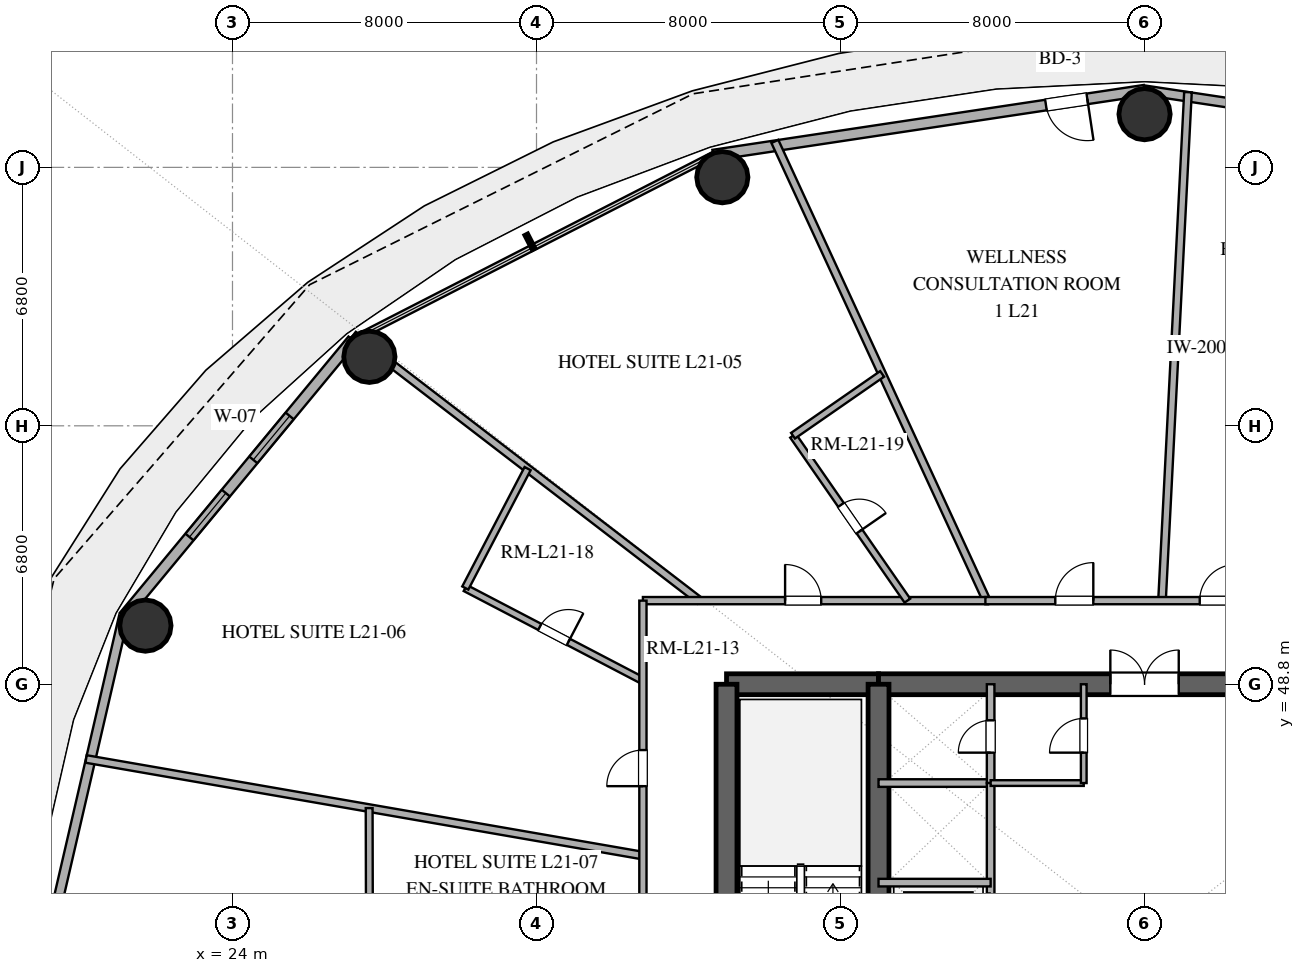
"""IFC4 building model, lengths in metres.
Left out: names, types, materials, properties, quantities, classifications, styles, units other than length and angle.
Written with IfcOpenShell. Run it as: python <this file> out.ifc"""

import sys

from ifc_helpers import new_model, si_unit, direction, frame, frame_2d, origin, origin_2d, place, context, subcontext, project, spatial, rectangle, hollow_circle, extrude, element, fill, save


model = new_model("IFC4")
c1 = context("Model", 3, precision=1e-05, world=origin(), true_north=direction((0.0, 1.0)))
c2 = subcontext(c1, "Body", "Model", "MODEL_VIEW")
j1 = project(units=[si_unit("LENGTHUNIT", "METRE"), si_unit("PLANEANGLEUNIT", "RADIAN")], contexts=[c1])
p1 = place(None, origin())
s1 = spatial("IfcSite", under=j1, at=p1, CompositionType="ELEMENT")
p2 = place(p1, origin())
s2 = spatial("IfcBuilding", under=s1, at=p2, CompositionType="ELEMENT")
p3 = place(p2, frame((0.0, 0.0, 87.6)))
s3 = spatial("IfcBuildingStorey", under=s2, at=p3, CompositionType="ELEMENT", Elevation=87.6)
p4 = place(p3, frame((37.0, 48.8, 0.0), z_axis=(0.0, 0.0, 1.0), x_axis=(1.0, 0.0, 0.0)))
e1 = element("IfcWall", 1, at=p4, inside=s3, PredefinedType="SHEAR", context=c2, shape_type="SweptSolid", body=[
    extrude(rectangle(XDim=4.0, YDim=0.55, at=frame_2d((2.0, 0.0))), origin(), (0.0, 0.0, 1.0), 3.38),
])
p5 = place(p3, frame((41.0, 48.8, 0.0), z_axis=(0.0, 0.0, 1.0), x_axis=(1.0, 0.0, 0.0)))
e2 = element("IfcWall", 2, at=p5, inside=s3, PredefinedType="SHEAR", context=c2, shape_type="SweptSolid", body=[
    extrude(rectangle(XDim=14.0, YDim=0.55, at=frame_2d((7.0, 0.0))), origin(), (0.0, 0.0, 1.0), 3.38),
])
p6 = place(p5, frame((6.1, 0.0, 0.0)))
e3 = element("IfcOpeningElement", 3, at=p6, cuts=e2, PredefinedType="OPENING", context=c2, shape_type="SweptSolid", body=[
    extrude(rectangle(XDim=1.8, YDim=2.25, at=frame_2d((0.9, 1.125))), frame((0.0, 0.285, 0.0), z_axis=(0.0, -1.0, 0.0), x_axis=(1.0, 0.0, 0.0)), (0.0, 0.0, 1.0), 0.57),
])
p7 = place(p3, frame((37.0, 35.2, 0.0), z_axis=(0.0, 0.0, 1.0), x_axis=(0.0, 1.0, 0.0)))
e4 = element("IfcWall", 4, at=p7, inside=s3, PredefinedType="SHEAR", context=c2, shape_type="SweptSolid", body=[
    extrude(rectangle(XDim=13.6, YDim=0.55, at=frame_2d((6.8, 0.0))), origin(), (0.0, 0.0, 1.0), 3.38),
])
p8 = place(p7, frame((1.5, 0.0, 0.0)))
e5 = element("IfcOpeningElement", 5, at=p8, cuts=e4, PredefinedType="OPENING", context=c2, shape_type="SweptSolid", body=[
    extrude(rectangle(XDim=1.2, YDim=2.15, at=frame_2d((0.6, 1.075))), frame((0.0, 0.285, 0.0), z_axis=(0.0, -1.0, 0.0), x_axis=(1.0, 0.0, 0.0)), (0.0, 0.0, 1.0), 0.57),
])
p9 = place(p3, frame((41.0, 35.2, 0.0), z_axis=(0.0, 0.0, 1.0), x_axis=(0.0, 1.0, 0.0)))
e6 = element("IfcWall", 6, at=p9, inside=s3, PredefinedType="SHEAR", context=c2, shape_type="SweptSolid", body=[
    extrude(rectangle(XDim=13.6, YDim=0.55, at=frame_2d((6.8, 0.0))), origin(), (0.0, 0.0, 1.0), 3.38),
])
p10 = place(p9, frame((1.15, 0.0, 0.0)))
e7 = element("IfcOpeningElement", 7, at=p10, cuts=e6, PredefinedType="OPENING", context=c2, shape_type="SweptSolid", body=[
    extrude(rectangle(XDim=1.1, YDim=2.2, at=frame_2d((0.55, 1.1))), frame((0.0, 0.285, 0.0), z_axis=(0.0, -1.0, 0.0), x_axis=(1.0, 0.0, 0.0)), (0.0, 0.0, 1.0), 0.57),
])
for number, where, z_axis, x_axis in (
    (8, (48.0, 63.8, 0.0), (0.0, 0.0, 1.0), (1.0, 0.0, 0.0)),
    (9, (36.89, 62.141, 0.0), (0.0, 0.0, 1.0), (1.0, 0.0, 0.0)),
    (10, (27.602, 57.415, 0.0), (0.0, 0.0, 1.0), (1.0, 0.0, 0.0)),
    (11, (21.709, 50.343, 0.0), (0.0, 0.0, 1.0), (1.0, 0.0, 0.0)),
):
    element("IfcColumn", number, at=place(p3, frame(where, z_axis=z_axis, x_axis=x_axis)), inside=s3, PredefinedType="COLUMN", context=c2, shape_type="SweptSolid", body=[
        extrude(hollow_circle(Radius=0.675, WallThickness=0.036, at=origin_2d()), origin(), (0.0, 0.0, 1.0), 3.38),
    ])
p11 = place(p3, frame((59.351, 62.723, 0.0), z_axis=(0.0, 0.0, 1.0), x_axis=(-0.988877774656, 0.148730450117, 0.0)))
e12 = element("IfcWall", 12, at=p11, inside=s3, PredefinedType="SOLIDWALL", context=c2, shape_type="SweptSolid", body=[
    extrude(rectangle(XDim=11.479, YDim=0.25, at=frame_2d((5.74, 0.0))), origin(), (0.0, 0.0, 1.0), 3.38),
])
p12 = place(p11, frame((7.508, 0.0, 1.42)))
e13 = element("IfcOpeningElement", 13, at=p12, cuts=e12, PredefinedType="OPENING", context=c2, shape_type="SweptSolid", body=[
    extrude(rectangle(XDim=1.0, YDim=1.05, at=frame_2d((0.5, 0.525))), frame((0.0, 0.135, 0.0), z_axis=(0.0, -1.0, 0.0), x_axis=(1.0, 0.0, 0.0)), (0.0, 0.0, 1.0), 0.27),
])
p13 = place(p3, frame((48.0, 64.43, 0.0), z_axis=(0.0, 0.0, 1.0), x_axis=(-0.988877774656, -0.148730450117, 0.0)))
e14 = element("IfcWall", 14, at=p13, inside=s3, PredefinedType="SOLIDWALL", context=c2, shape_type="SweptSolid", body=[
    extrude(rectangle(XDim=11.479, YDim=0.28, at=frame_2d((5.74, 0.0))), origin(), (0.0, 0.0, 1.0), 3.38),
])
p14 = place(p13, frame((1.524, 0.0, 0.0)))
e15 = element("IfcOpeningElement", 15, at=p14, cuts=e14, PredefinedType="OPENING", context=c2, shape_type="SweptSolid", body=[
    extrude(rectangle(XDim=1.1, YDim=2.25, at=frame_2d((0.55, 1.125))), frame((0.0, 0.15, 0.0), z_axis=(0.0, -1.0, 0.0), x_axis=(1.0, 0.0, 0.0)), (0.0, 0.0, 1.0), 0.3),
])
p15 = place(p3, frame((27.16, 57.86, 0.0), z_axis=(0.0, 0.0, 1.0), x_axis=(-0.637505817448, -0.770445541696, 0.0)))
e16 = element("IfcWall", 16, at=p15, inside=s3, PredefinedType="SOLIDWALL", context=c2, shape_type="SweptSolid", body=[
    extrude(rectangle(XDim=9.445, YDim=0.28, at=frame_2d((4.723, 0.0))), origin(), (0.0, 0.0, 1.0), 3.38),
])
p16 = place(p15, frame((2.597, 0.0, 0.85)))
e17 = element("IfcOpeningElement", 17, at=p16, cuts=e16, PredefinedType="OPENING", context=c2, shape_type="SweptSolid", body=[
    extrude(rectangle(XDim=1.5, YDim=1.8, at=frame_2d((0.75, 0.9))), frame((0.0, 0.15, 0.0), z_axis=(0.0, -1.0, 0.0), x_axis=(1.0, 0.0, 0.0)), (0.0, 0.0, 1.0), 0.3),
])
p17 = place(p15, frame((5.232, 0.0, 0.85)))
e18 = element("IfcOpeningElement", 18, at=p17, cuts=e16, PredefinedType="OPENING", context=c2, shape_type="SweptSolid", body=[
    extrude(rectangle(XDim=1.5, YDim=1.8, at=frame_2d((0.75, 0.9))), frame((0.0, 0.15, 0.0), z_axis=(0.0, -1.0, 0.0), x_axis=(1.0, 0.0, 0.0)), (0.0, 0.0, 1.0), 0.3),
])
p18 = place(p3, frame((21.139, 50.583, 0.0), z_axis=(0.0, 0.0, 1.0), x_axis=(-0.22558597182, -0.974223264616, 0.0)))
e19 = element("IfcWall", 19, at=p18, inside=s3, PredefinedType="SOLIDWALL", context=c2, shape_type="SweptSolid", body=[
    extrude(rectangle(XDim=8.811, YDim=0.25, at=frame_2d((4.405, 0.0))), origin(), (0.0, 0.0, 1.0), 3.38),
])
p19 = place(p3, frame((41.0, 46.2, 0.0), z_axis=(0.0, 0.0, 1.0), x_axis=(1.0, 0.0, 0.0)))
e20 = element("IfcWall", 20, at=p19, inside=s3, PredefinedType="SOLIDWALL", context=c2, shape_type="SweptSolid", body=[
    extrude(rectangle(XDim=2.95, YDim=0.2, at=frame_2d((1.475, 0.0))), origin(), (0.0, 0.0, 1.0), 2.74),
])
p20 = place(p3, frame((43.95, 46.2, 0.0), z_axis=(0.0, 0.0, 1.0), x_axis=(0.0, 1.0, 0.0)))
e21 = element("IfcWall", 21, at=p20, inside=s3, PredefinedType="SOLIDWALL", context=c2, shape_type="SweptSolid", body=[
    extrude(rectangle(XDim=2.6, YDim=0.2, at=frame_2d((1.3, 0.0))), origin(), (0.0, 0.0, 1.0), 2.74),
])
p21 = place(p20, frame((0.8, 0.0, 0.0)))
e22 = element("IfcOpeningElement", 22, at=p21, cuts=e21, PredefinedType="OPENING", context=c2, shape_type="SweptSolid", body=[
    extrude(rectangle(XDim=0.85, YDim=2.15, at=frame_2d((0.425, 1.075))), frame((0.0, 0.11, 0.0), z_axis=(0.0, -1.0, 0.0), x_axis=(1.0, 0.0, 0.0)), (0.0, 0.0, 1.0), 0.22),
])
p22 = place(p3, frame((43.95, 38.4, 0.0), z_axis=(0.0, 0.0, 1.0), x_axis=(0.0, 1.0, 0.0)))
e23 = element("IfcWall", 23, at=p22, inside=s3, PredefinedType="SOLIDWALL", context=c2, shape_type="SweptSolid", body=[
    extrude(rectangle(XDim=7.8, YDim=0.2, at=frame_2d((3.9, 0.0))), origin(), (0.0, 0.0, 1.0), 2.74),
])
p23 = place(p22, frame((0.7, 0.0, 0.0)))
e24 = element("IfcOpeningElement", 24, at=p23, cuts=e23, PredefinedType="OPENING", context=c2, shape_type="SweptSolid", body=[
    extrude(rectangle(XDim=1.1, YDim=2.2, at=frame_2d((0.55, 1.1))), frame((0.0, 0.11, 0.0), z_axis=(0.0, -1.0, 0.0), x_axis=(1.0, 0.0, 0.0)), (0.0, 0.0, 1.0), 0.22),
])
p24 = place(p22, frame((3.3, 0.0, 0.0)))
e25 = element("IfcOpeningElement", 25, at=p24, cuts=e23, PredefinedType="OPENING", context=c2, shape_type="SweptSolid", body=[
    extrude(rectangle(XDim=1.1, YDim=2.2, at=frame_2d((0.55, 1.1))), frame((0.0, 0.11, 0.0), z_axis=(0.0, -1.0, 0.0), x_axis=(1.0, 0.0, 0.0)), (0.0, 0.0, 1.0), 0.22),
])
p25 = place(p3, frame((41.0, 43.58, 0.0), z_axis=(0.0, 0.0, 1.0), x_axis=(1.0, 0.0, 0.0)))
e26 = element("IfcWall", 26, at=p25, inside=s3, PredefinedType="SOLIDWALL", context=c2, shape_type="SweptSolid", body=[
    extrude(rectangle(XDim=2.95, YDim=0.2, at=frame_2d((1.475, 0.0))), origin(), (0.0, 0.0, 1.0), 2.74),
])
p26 = place(p3, frame((43.95, 46.2, 0.0), z_axis=(0.0, 0.0, 1.0), x_axis=(1.0, 0.0, 0.0)))
e27 = element("IfcWall", 27, at=p26, inside=s3, PredefinedType="PARTITIONING", context=c2, shape_type="SweptSolid", body=[
    extrude(rectangle(XDim=2.45, YDim=0.15, at=frame_2d((1.225, 0.0))), origin(), (0.0, 0.0, 1.0), 2.74),
])
p27 = place(p3, frame((46.4, 46.2, 0.0), z_axis=(0.0, 0.0, 1.0), x_axis=(0.0, 1.0, 0.0)))
e28 = element("IfcWall", 28, at=p27, inside=s3, PredefinedType="PARTITIONING", context=c2, shape_type="SweptSolid", body=[
    extrude(rectangle(XDim=2.6, YDim=0.15, at=frame_2d((1.3, 0.0))), origin(), (0.0, 0.0, 1.0), 2.74),
])
p28 = place(p27, frame((0.8, 0.0, 0.0)))
e29 = element("IfcOpeningElement", 29, at=p28, cuts=e28, PredefinedType="OPENING", context=c2, shape_type="SweptSolid", body=[
    extrude(rectangle(XDim=0.9, YDim=2.15, at=frame_2d((0.45, 1.075))), frame((0.0, 0.085, 0.0), z_axis=(0.0, -1.0, 0.0), x_axis=(1.0, 0.0, 0.0)), (0.0, 0.0, 1.0), 0.17),
])
p29 = place(p3, frame((49.143, 64.379, 0.0), z_axis=(0.0, 0.0, 1.0), x_axis=(-0.050973793346, -0.998699991185, 0.0)))
e30 = element("IfcWall", 30, at=p29, inside=s3, PredefinedType="PARTITIONING", context=c2, shape_type="SweptSolid", body=[
    extrude(rectangle(XDim=13.396, YDim=0.2, at=frame_2d((6.698, 0.0))), origin(), (0.0, 0.0, 1.0), 2.74),
])
p30 = place(p3, frame((34.8, 44.291, 0.0), z_axis=(0.0, 0.0, 1.0), x_axis=(-0.985271938133, 0.170994759944, 0.0)))
e31 = element("IfcWall", 31, at=p30, inside=s3, PredefinedType="PARTITIONING", context=c2, shape_type="SweptSolid", body=[
    extrude(rectangle(XDim=14.872, YDim=0.2, at=frame_2d((7.436, 0.0))), origin(), (0.0, 0.0, 1.0), 2.74),
])
p31 = place(p3, frame((43.847, 51.0, 0.0), z_axis=(0.0, 0.0, 1.0), x_axis=(-0.418953467184, 0.908007704997, 0.0)))
e32 = element("IfcWall", 32, at=p31, inside=s3, PredefinedType="PARTITIONING", context=c2, shape_type="SweptSolid", body=[
    extrude(rectangle(XDim=13.307, YDim=0.2, at=frame_2d((6.654, 0.0))), origin(), (0.0, 0.0, 1.0), 2.74),
])
p32 = place(p3, frame((36.287, 51.0, 0.0), z_axis=(0.0, 0.0, 1.0), x_axis=(-0.792955910196, 0.609279020224, 0.0)))
e33 = element("IfcWall", 33, at=p32, inside=s3, PredefinedType="PARTITIONING", context=c2, shape_type="SweptSolid", body=[
    extrude(rectangle(XDim=11.48, YDim=0.2, at=frame_2d((5.74, 0.0))), origin(), (0.0, 0.0, 1.0), 2.74),
])
p33 = place(p3, frame((34.8, 51.0, 0.0), z_axis=(0.0, 0.0, 1.0), x_axis=(1.0, 0.0, 0.0)))
e34 = element("IfcWall", 34, at=p33, inside=s3, PredefinedType="PARTITIONING", context=c2, shape_type="SweptSolid", body=[
    extrude(rectangle(XDim=9.083, YDim=0.19, at=frame_2d((4.541, 0.0))), origin(), (0.0, 0.0, 1.0), 2.74),
])
p34 = place(p33, frame((3.741, 0.0, 0.0)))
e35 = element("IfcOpeningElement", 35, at=p34, cuts=e34, PredefinedType="OPENING", context=c2, shape_type="SweptSolid", body=[
    extrude(rectangle(XDim=0.95, YDim=2.15, at=frame_2d((0.475, 1.075))), frame((0.0, 0.105, 0.0), z_axis=(0.0, -1.0, 0.0), x_axis=(1.0, 0.0, 0.0)), (0.0, 0.0, 1.0), 0.21),
])
p35 = place(p3, frame((38.75, 55.34, 0.0), z_axis=(0.0, 0.0, 1.0), x_axis=(0.569842064311, -0.821754234393, 0.0)))
e36 = element("IfcWall", 36, at=p35, inside=s3, PredefinedType="PLUMBINGWALL", context=c2, shape_type="SweptSolid", body=[
    extrude(rectangle(XDim=5.281, YDim=0.18, at=frame_2d((2.641, 0.0))), origin(), (0.0, 0.0, 1.0), 2.74),
])
p36 = place(p35, frame((2.215, 0.0, 0.0)))
e37 = element("IfcOpeningElement", 37, at=p36, cuts=e36, PredefinedType="OPENING", context=c2, shape_type="SweptSolid", body=[
    extrude(rectangle(XDim=0.85, YDim=2.1, at=frame_2d((0.425, 1.05))), frame((0.0, 0.1, 0.0), z_axis=(0.0, -1.0, 0.0), x_axis=(1.0, 0.0, 0.0)), (0.0, 0.0, 1.0), 0.2),
])
p37 = place(p3, frame((30.126, 51.332, 0.0), z_axis=(0.0, 0.0, 1.0), x_axis=(0.886465103711, -0.462795440668, 0.0)))
e38 = element("IfcWall", 38, at=p37, inside=s3, PredefinedType="PLUMBINGWALL", context=c2, shape_type="SweptSolid", body=[
    extrude(rectangle(XDim=5.273, YDim=0.18, at=frame_2d((2.636, 0.0))), origin(), (0.0, 0.0, 1.0), 2.74),
])
p38 = place(p37, frame((2.211, 0.0, 0.0)))
e39 = element("IfcOpeningElement", 39, at=p38, cuts=e38, PredefinedType="OPENING", context=c2, shape_type="SweptSolid", body=[
    extrude(rectangle(XDim=0.85, YDim=2.1, at=frame_2d((0.425, 1.05))), frame((0.0, 0.1, 0.0), z_axis=(0.0, -1.0, 0.0), x_axis=(1.0, 0.0, 0.0)), (0.0, 0.0, 1.0), 0.2),
])
p39 = place(p3, frame((43.812, 51.0, 0.0), z_axis=(0.0, 0.0, 1.0), x_axis=(1.0, 0.0, 0.0)))
e40 = element("IfcWall", 40, at=p39, inside=s3, PredefinedType="PARTITIONING", context=c2, shape_type="SweptSolid", body=[
    extrude(rectangle(XDim=7.613, YDim=0.19, at=frame_2d((3.807, 0.0))), origin(), (0.0, 0.0, 1.0), 2.74),
])
p40 = place(p39, frame((1.84, 0.0, 0.0)))
e41 = element("IfcOpeningElement", 41, at=p40, cuts=e40, PredefinedType="OPENING", context=c2, shape_type="SweptSolid", body=[
    extrude(rectangle(XDim=1.0, YDim=2.2, at=frame_2d((0.5, 1.1))), frame((0.0, 0.105, 0.0), z_axis=(0.0, -1.0, 0.0), x_axis=(1.0, 0.0, 0.0)), (0.0, 0.0, 1.0), 0.21),
])
p41 = place(p39, frame((5.639, 0.0, 0.0)))
e42 = element("IfcOpeningElement", 42, at=p41, cuts=e40, PredefinedType="OPENING", context=c2, shape_type="SweptSolid", body=[
    extrude(rectangle(XDim=0.95, YDim=2.15, at=frame_2d((0.475, 1.075))), frame((0.0, 0.105, 0.0), z_axis=(0.0, -1.0, 0.0), x_axis=(1.0, 0.0, 0.0)), (0.0, 0.0, 1.0), 0.21),
])
p42 = place(p3, frame((34.8, 41.94, 0.0), z_axis=(0.0, 0.0, 1.0), x_axis=(0.0, 1.0, 0.0)))
e43 = element("IfcWall", 43, at=p42, inside=s3, PredefinedType="PARTITIONING", context=c2, shape_type="SweptSolid", body=[
    extrude(rectangle(XDim=9.06, YDim=0.19, at=frame_2d((4.53, 0.0))), origin(), (0.0, 0.0, 1.0), 2.74),
])
p43 = place(p42, frame((4.179, 0.0, 0.0)))
e44 = element("IfcOpeningElement", 44, at=p43, cuts=e43, PredefinedType="OPENING", context=c2, shape_type="SweptSolid", body=[
    extrude(rectangle(XDim=0.95, YDim=2.15, at=frame_2d((0.475, 1.075))), frame((0.0, 0.105, 0.0), z_axis=(0.0, -1.0, 0.0), x_axis=(1.0, 0.0, 0.0)), (0.0, 0.0, 1.0), 0.21),
])
p44 = place(p3, frame((27.596, 45.541, 0.0), z_axis=(0.0, 0.0, 1.0), x_axis=(0.002179237538, -0.999997625459, 0.0)))
e45 = element("IfcWall", 45, at=p44, inside=s3, PredefinedType="PLUMBINGWALL", context=c2, shape_type="SweptSolid", body=[
    extrude(rectangle(XDim=3.585, YDim=0.18, at=frame_2d((1.792, 0.0))), origin(), (0.0, 0.0, 1.0), 2.74),
])
p45 = place(p3, frame((31.766, 54.474, 0.0), z_axis=(0.0, 0.0, 1.0), x_axis=(-0.462822582901, -0.886450933079, 0.0)))
e46 = element("IfcWall", 46, at=p45, inside=s3, PredefinedType="PLUMBINGWALL", context=c2, shape_type="SweptSolid", body=[
    extrude(rectangle(XDim=3.544, YDim=0.18, at=frame_2d((1.772, 0.0))), origin(), (0.0, 0.0, 1.0), 2.74),
])
p46 = place(p3, frame((41.095, 56.965, 0.0), z_axis=(0.0, 0.0, 1.0), x_axis=(-0.821788449593, -0.569792720308, 0.0)))
e47 = element("IfcWall", 47, at=p46, inside=s3, PredefinedType="PLUMBINGWALL", context=c2, shape_type="SweptSolid", body=[
    extrude(rectangle(XDim=2.853, YDim=0.18, at=frame_2d((1.427, 0.0))), origin(), (0.0, 0.0, 1.0), 2.74),
])
p47 = place(p14, origin())
e48 = element("IfcDoor", 48, at=p47, inside=s3, OperationType="SINGLE_SWING_LEFT", PredefinedType="DOOR", context=c2, shape_type="SweptSolid", body=[
    extrude(rectangle(XDim=1.1, YDim=2.25, at=frame_2d((0.55, 1.125))), frame((0.0, 0.025, 0.0), z_axis=(0.0, -1.0, 0.0), x_axis=(1.0, 0.0, 0.0)), (0.0, 0.0, 1.0), 0.05),
])
fill(e15, e48)
p48 = place(p16, origin())
e49 = element("IfcWindow", 49, at=p48, inside=s3, PartitioningType="SINGLE_PANEL", PredefinedType="WINDOW", context=c2, shape_type="SweptSolid", body=[
    extrude(rectangle(XDim=1.5, YDim=1.8, at=frame_2d((0.75, 0.9))), frame((0.0, 0.03, 0.0), z_axis=(0.0, -1.0, 0.0), x_axis=(1.0, 0.0, 0.0)), (0.0, 0.0, 1.0), 0.06),
])
fill(e17, e49)
p49 = place(p17, origin())
e50 = element("IfcWindow", 50, at=p49, inside=s3, PartitioningType="SINGLE_PANEL", PredefinedType="WINDOW", context=c2, shape_type="SweptSolid", body=[
    extrude(rectangle(XDim=1.5, YDim=1.8, at=frame_2d((0.75, 0.9))), frame((0.0, 0.03, 0.0), z_axis=(0.0, -1.0, 0.0), x_axis=(1.0, 0.0, 0.0)), (0.0, 0.0, 1.0), 0.06),
])
fill(e18, e50)
p50 = place(p6, origin())
e51 = element("IfcDoor", 51, at=p50, inside=s3, OperationType="DOUBLE_DOOR_SINGLE_SWING", PredefinedType="DOOR", context=c2, shape_type="SweptSolid", body=[
    extrude(rectangle(XDim=1.8, YDim=2.25, at=frame_2d((0.9, 1.125))), frame((0.0, 0.025, 0.0), z_axis=(0.0, -1.0, 0.0), x_axis=(1.0, 0.0, 0.0)), (0.0, 0.0, 1.0), 0.05),
])
fill(e3, e51)
p51 = place(p21, origin())
e52 = element("IfcDoor", 52, at=p51, inside=s3, OperationType="SINGLE_SWING_LEFT", PredefinedType="DOOR", context=c2, shape_type="SweptSolid", body=[
    extrude(rectangle(XDim=0.85, YDim=2.15, at=frame_2d((0.425, 1.075))), frame((0.0, 0.025, 0.0), z_axis=(0.0, -1.0, 0.0), x_axis=(1.0, 0.0, 0.0)), (0.0, 0.0, 1.0), 0.05),
])
fill(e22, e52)
p52 = place(p28, origin())
e53 = element("IfcDoor", 53, at=p52, inside=s3, OperationType="SINGLE_SWING_LEFT", PredefinedType="DOOR", context=c2, shape_type="SweptSolid", body=[
    extrude(rectangle(XDim=0.9, YDim=2.15, at=frame_2d((0.45, 1.075))), frame((0.0, 0.025, 0.0), z_axis=(0.0, -1.0, 0.0), x_axis=(1.0, 0.0, 0.0)), (0.0, 0.0, 1.0), 0.05),
])
fill(e29, e53)
p53 = place(p34, origin())
e54 = element("IfcDoor", 54, at=p53, inside=s3, OperationType="SINGLE_SWING_LEFT", PredefinedType="DOOR", context=c2, shape_type="SweptSolid", body=[
    extrude(rectangle(XDim=0.95, YDim=2.15, at=frame_2d((0.475, 1.075))), frame((0.0, 0.025, 0.0), z_axis=(0.0, -1.0, 0.0), x_axis=(1.0, 0.0, 0.0)), (0.0, 0.0, 1.0), 0.05),
])
fill(e35, e54)
p54 = place(p36, origin())
e55 = element("IfcDoor", 55, at=p54, inside=s3, OperationType="SINGLE_SWING_RIGHT", PredefinedType="DOOR", context=c2, shape_type="SweptSolid", body=[
    extrude(rectangle(XDim=0.85, YDim=2.1, at=frame_2d((0.425, 1.05))), frame((0.0, 0.025, 0.0), z_axis=(0.0, -1.0, 0.0), x_axis=(1.0, 0.0, 0.0)), (0.0, 0.0, 1.0), 0.05),
])
fill(e37, e55)
p55 = place(p38, origin())
e56 = element("IfcDoor", 56, at=p55, inside=s3, OperationType="SINGLE_SWING_RIGHT", PredefinedType="DOOR", context=c2, shape_type="SweptSolid", body=[
    extrude(rectangle(XDim=0.85, YDim=2.1, at=frame_2d((0.425, 1.05))), frame((0.0, 0.025, 0.0), z_axis=(0.0, -1.0, 0.0), x_axis=(1.0, 0.0, 0.0)), (0.0, 0.0, 1.0), 0.05),
])
fill(e39, e56)
p56 = place(p40, origin())
e57 = element("IfcDoor", 57, at=p56, inside=s3, OperationType="SINGLE_SWING_RIGHT", PredefinedType="DOOR", context=c2, shape_type="SweptSolid", body=[
    extrude(rectangle(XDim=1.0, YDim=2.2, at=frame_2d((0.5, 1.1))), frame((0.0, 0.025, 0.0), z_axis=(0.0, -1.0, 0.0), x_axis=(1.0, 0.0, 0.0)), (0.0, 0.0, 1.0), 0.05),
])
fill(e41, e57)
p57 = place(p41, origin())
e58 = element("IfcDoor", 58, at=p57, inside=s3, OperationType="SINGLE_SWING_RIGHT", PredefinedType="DOOR", context=c2, shape_type="SweptSolid", body=[
    extrude(rectangle(XDim=0.95, YDim=2.15, at=frame_2d((0.475, 1.075))), frame((0.0, 0.025, 0.0), z_axis=(0.0, -1.0, 0.0), x_axis=(1.0, 0.0, 0.0)), (0.0, 0.0, 1.0), 0.05),
])
fill(e42, e58)
p58 = place(p43, origin())
e59 = element("IfcDoor", 59, at=p58, inside=s3, OperationType="SINGLE_SWING_LEFT", PredefinedType="DOOR", context=c2, shape_type="SweptSolid", body=[
    extrude(rectangle(XDim=0.95, YDim=2.15, at=frame_2d((0.475, 1.075))), frame((0.0, 0.025, 0.0), z_axis=(0.0, -1.0, 0.0), x_axis=(1.0, 0.0, 0.0)), (0.0, 0.0, 1.0), 0.05),
])
fill(e44, e59)
save(model, sys.argv[1])
